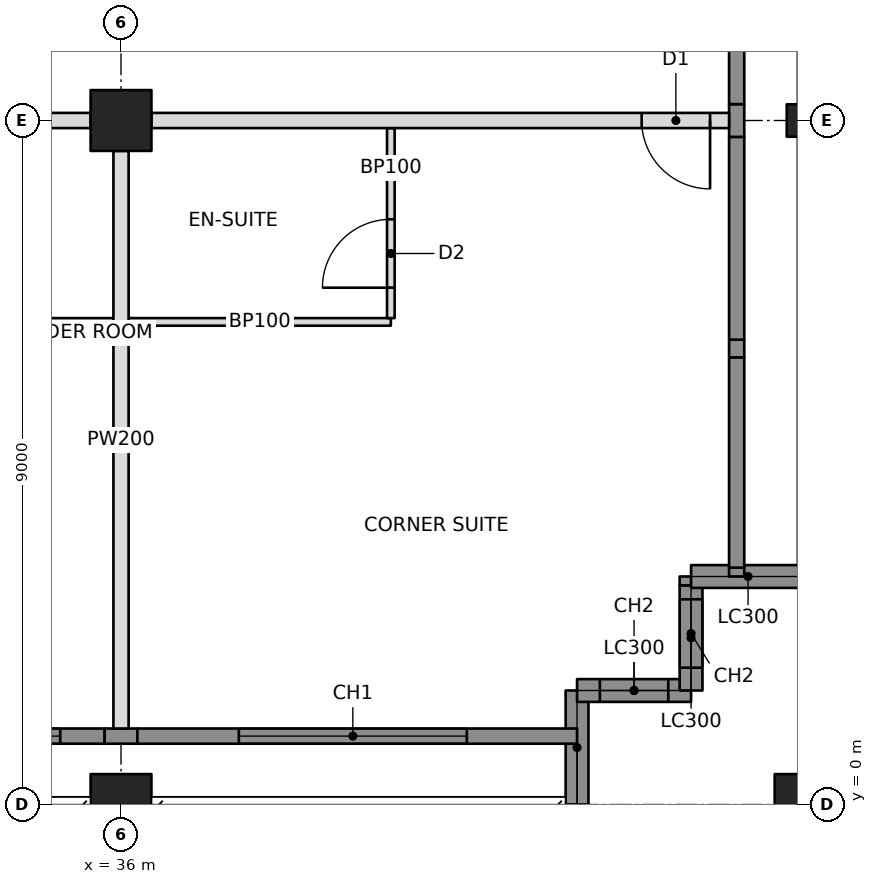
"""IFC4 building model, lengths in metres.
Left out: names, types, materials, properties, quantities, classifications, styles, units other than length and angle.
Written with IfcOpenShell. Run it as: python <this file> out.ifc"""

import sys

from ifc_helpers import new_model, si_unit, direction, frame, frame_2d, origin, origin_2d, place, context, subcontext, project, spatial, rectangle, hollow_rectangle, i_section, extrude, element, fill, save


model = new_model("IFC4")
c1 = context("Model", 3, precision=1e-05, world=origin(), true_north=direction((0.0, 1.0)))
c2 = subcontext(c1, "Body", "Model", "MODEL_VIEW")
j1 = project(units=[si_unit("LENGTHUNIT", "METRE"), si_unit("PLANEANGLEUNIT", "RADIAN")], contexts=[c1])
p1 = place(None, origin())
s1 = spatial("IfcSite", under=j1, at=p1, CompositionType="ELEMENT")
p2 = place(p1, origin())
s2 = spatial("IfcBuilding", under=s1, at=p2, CompositionType="ELEMENT")
p3 = place(p2, frame((0.0, 0.0, 218.2)))
s3 = spatial("IfcBuildingStorey", under=s2, at=p3, CompositionType="ELEMENT", Elevation=218.2)
p4 = place(p3, frame((36.0, 0.0, 0.0), z_axis=(0.0, 0.0, 1.0), x_axis=(1.0, 0.0, 0.0)))
e1 = element("IfcColumn", 1, at=p4, inside=s3, PredefinedType="COLUMN", context=c2, shape_type="SweptSolid", body=[
    extrude(hollow_rectangle(XDim=0.8, YDim=0.8, WallThickness=0.06, at=origin_2d()), origin(), (0.0, 0.0, 1.0), 3.4),
])
p5 = place(p3, frame((36.0, 9.0, 0.0), z_axis=(0.0, 0.0, 1.0), x_axis=(0.0, 1.0, 0.0)))
e2 = element("IfcColumn", 2, at=p5, inside=s3, PredefinedType="COLUMN", context=c2, shape_type="SweptSolid", body=[
    extrude(hollow_rectangle(XDim=0.8, YDim=0.8, WallThickness=0.1, at=origin_2d()), origin(), (0.0, 0.0, 1.0), 3.4),
])
p6 = place(p3, frame((45.0, 0.0, 0.0), z_axis=(0.0, 0.0, 1.0), x_axis=(1.0, 0.0, 0.0)))
e3 = element("IfcColumn", 3, at=p6, inside=s3, PredefinedType="COLUMN", context=c2, shape_type="SweptSolid", body=[
    extrude(hollow_rectangle(XDim=0.8, YDim=0.8, WallThickness=0.06, at=origin_2d()), origin(), (0.0, 0.0, 1.0), 3.4),
])
p7 = place(p3, frame((45.0, 9.0, 0.0), z_axis=(0.0, 0.0, 1.0), x_axis=(0.0, 1.0, 0.0)))
e4 = element("IfcColumn", 4, at=p7, inside=s3, PredefinedType="COLUMN", context=c2, shape_type="SweptSolid", body=[
    extrude(i_section(OverallWidth=0.427, OverallDepth=0.483, WebThickness=0.051, FlangeThickness=0.082, at=origin_2d()), origin(), (0.0, 0.0, 1.0), 3.4),
])
p8 = place(p3, frame((42.0, 0.0, 0.0), z_axis=(0.0, 0.0, 1.0), x_axis=(0.0, 1.0, 0.0)))
e5 = element("IfcWall", 5, at=p8, inside=s3, PredefinedType="SOLIDWALL", context=c2, shape_type="SweptSolid", body=[
    extrude(rectangle(XDim=1.5, YDim=0.3, at=frame_2d((0.75, 0.0))), origin(), (0.0, 0.0, 1.0), 2.202),
])
p9 = place(p3, frame((42.0, 1.5, 0.0), z_axis=(0.0, 0.0, 1.0), x_axis=(1.0, 0.0, 0.0)))
e6 = element("IfcWall", 6, at=p9, inside=s3, PredefinedType="SOLIDWALL", context=c2, shape_type="SweptSolid", body=[
    extrude(rectangle(XDim=1.5, YDim=0.3, at=frame_2d((0.75, 0.0))), origin(), (0.0, 0.0, 1.0), 3.15),
])
p10 = place(p9, frame((0.3, 0.0, 0.6)))
e7 = element("IfcOpeningElement", 7, at=p10, cuts=e6, PredefinedType="OPENING", context=c2, shape_type="SweptSolid", body=[
    extrude(rectangle(XDim=0.9, YDim=2.2, at=frame_2d((0.45, 1.1))), frame((0.0, 0.16, 0.0), z_axis=(0.0, -1.0, 0.0), x_axis=(1.0, 0.0, 0.0)), (0.0, 0.0, 1.0), 0.32),
])
p11 = place(p3, frame((43.5, 1.5, 0.0), z_axis=(0.0, 0.0, 1.0), x_axis=(0.0, 1.0, 0.0)))
e8 = element("IfcWall", 8, at=p11, inside=s3, PredefinedType="SOLIDWALL", context=c2, shape_type="SweptSolid", body=[
    extrude(rectangle(XDim=1.384, YDim=0.3, at=frame_2d((0.692, 0.0))), origin(), (0.0, 0.0, 1.0), 3.15),
])
p12 = place(p11, frame((0.3, 0.0, 0.6)))
e9 = element("IfcOpeningElement", 9, at=p12, cuts=e8, PredefinedType="OPENING", context=c2, shape_type="SweptSolid", body=[
    extrude(rectangle(XDim=0.9, YDim=2.2, at=frame_2d((0.45, 1.1))), frame((0.0, 0.16, 0.0), z_axis=(0.0, -1.0, 0.0), x_axis=(1.0, 0.0, 0.0)), (0.0, 0.0, 1.0), 0.32),
])
p13 = place(p3, frame((43.5, 3.0, 0.0), z_axis=(0.0, 0.0, 1.0), x_axis=(1.0, 0.0, 0.0)))
e10 = element("IfcWall", 10, at=p13, inside=s3, PredefinedType="SOLIDWALL", context=c2, shape_type="SweptSolid", body=[
    extrude(rectangle(XDim=1.5, YDim=0.3, at=frame_2d((0.75, 0.0))), origin(), (0.0, 0.0, 1.0), 2.202),
])
p14 = place(p3, frame((44.1, 3.0, 0.0), z_axis=(0.0, 0.0, 1.0), x_axis=(0.0, 1.0, 0.0)))
e11 = element("IfcWall", 11, at=p14, inside=s3, PredefinedType="SOLIDWALL", context=c2, shape_type="SweptSolid", body=[
    extrude(rectangle(XDim=0.116, YDim=0.2, at=frame_2d((0.058, 0.0))), origin(), (0.0, 0.0, 1.0), 2.542),
])
p15 = place(p3, frame((27.4, 9.0, 0.0), z_axis=(0.0, 0.0, 1.0), x_axis=(1.0, 0.0, 0.0)))
e12 = element("IfcWall", 12, at=p15, inside=s3, PredefinedType="PARTITIONING", context=c2, shape_type="SweptSolid", body=[
    extrude(rectangle(XDim=8.2, YDim=0.2, at=frame_2d((4.1, 0.0))), origin(), (0.0, 0.0, 1.0), 2.21),
])
p16 = place(p15, frame((0.15, 0.0, 0.0)))
e13 = element("IfcOpeningElement", 13, at=p16, cuts=e12, PredefinedType="OPENING", context=c2, shape_type="SweptSolid", body=[
    extrude(rectangle(XDim=0.9, YDim=2.1, at=frame_2d((0.45, 1.05))), frame((0.0, 0.11, 0.0), z_axis=(0.0, -1.0, 0.0), x_axis=(1.0, 0.0, 0.0)), (0.0, 0.0, 1.0), 0.22),
])
p17 = place(p3, frame((36.4, 9.0, 0.0), z_axis=(0.0, 0.0, 1.0), x_axis=(1.0, 0.0, 0.0)))
e14 = element("IfcWall", 14, at=p17, inside=s3, PredefinedType="PARTITIONING", context=c2, shape_type="SweptSolid", body=[
    extrude(rectangle(XDim=7.6, YDim=0.2, at=frame_2d((3.8, 0.0))), origin(), (0.0, 0.0, 1.0), 2.21),
])
p18 = place(p17, frame((6.45, 0.0, 0.0)))
e15 = element("IfcOpeningElement", 15, at=p18, cuts=e14, PredefinedType="OPENING", context=c2, shape_type="SweptSolid", body=[
    extrude(rectangle(XDim=0.9, YDim=2.1, at=frame_2d((0.45, 1.05))), frame((0.0, 0.11, 0.0), z_axis=(0.0, -1.0, 0.0), x_axis=(1.0, 0.0, 0.0)), (0.0, 0.0, 1.0), 0.22),
])
p19 = place(p3, frame((36.0, 8.6, 0.0), z_axis=(0.0, 0.0, 1.0), x_axis=(0.0, -1.0, 0.0)))
e16 = element("IfcWall", 16, at=p19, inside=s3, PredefinedType="PARTITIONING", context=c2, shape_type="SweptSolid", body=[
    extrude(rectangle(XDim=7.6, YDim=0.2, at=frame_2d((3.8, 0.0))), origin(), (0.0, 0.0, 1.0), 2.21),
])
p20 = place(p3, frame((34.05, 6.35, 0.0), z_axis=(0.0, 0.0, 1.0), x_axis=(1.0, 0.0, 0.0)))
e17 = element("IfcWall", 17, at=p20, inside=s3, PredefinedType="PARTITIONING", context=c2, shape_type="SweptSolid", body=[
    extrude(rectangle(XDim=1.85, YDim=0.1, at=frame_2d((0.925, 0.0))), origin(), (0.0, 0.0, 1.0), 2.21),
])
p21 = place(p3, frame((36.1, 6.35, 0.0), z_axis=(0.0, 0.0, 1.0), x_axis=(1.0, 0.0, 0.0)))
e18 = element("IfcWall", 18, at=p21, inside=s3, PredefinedType="PARTITIONING", context=c2, shape_type="SweptSolid", body=[
    extrude(rectangle(XDim=3.45, YDim=0.1, at=frame_2d((1.725, 0.0))), origin(), (0.0, 0.0, 1.0), 2.21),
])
p22 = place(p3, frame((39.55, 8.9, 0.0), z_axis=(0.0, 0.0, 1.0), x_axis=(0.0, -1.0, 0.0)))
e19 = element("IfcWall", 19, at=p22, inside=s3, PredefinedType="PARTITIONING", context=c2, shape_type="SweptSolid", body=[
    extrude(rectangle(XDim=2.5, YDim=0.1, at=frame_2d((1.25, 0.0))), origin(), (0.0, 0.0, 1.0), 2.21),
])
p23 = place(p22, frame((1.2, 0.0, 0.0)))
e20 = element("IfcOpeningElement", 20, at=p23, cuts=e19, PredefinedType="OPENING", context=c2, shape_type="SweptSolid", body=[
    extrude(rectangle(XDim=0.9, YDim=2.1, at=frame_2d((0.45, 1.05))), frame((0.0, 0.06, 0.0), z_axis=(0.0, -1.0, 0.0), x_axis=(1.0, 0.0, 0.0)), (0.0, 0.0, 1.0), 0.12),
])
p24 = place(p3, frame((43.5, 2.884, 0.0), z_axis=(0.0, 0.0, 1.0), x_axis=(0.0, 1.0, 0.0)))
e21 = element("IfcWall", 21, at=p24, inside=s3, PredefinedType="SOLIDWALL", context=c2, shape_type="SweptSolid", body=[
    extrude(rectangle(XDim=0.116, YDim=0.3, at=frame_2d((0.058, 0.0))), origin(), (0.0, 0.0, 1.0), 2.542),
])
p25 = place(p3, frame((27.214, 0.9, 0.0), z_axis=(0.0, 0.0, 1.0), x_axis=(1.0, 0.0, 0.0)))
e22 = element("IfcWall", 22, at=p25, inside=s3, PredefinedType="SOLIDWALL", context=c2, shape_type="SweptSolid", body=[
    extrude(rectangle(XDim=8.571, YDim=0.2, at=frame_2d((4.285, 0.0))), origin(), (0.0, 0.0, 1.0), 3.15),
])
p26 = place(p25, frame((0.586, 0.0, 0.6)))
e23 = element("IfcOpeningElement", 23, at=p26, cuts=e22, PredefinedType="OPENING", context=c2, shape_type="SweptSolid", body=[
    extrude(rectangle(XDim=3.0, YDim=2.2, at=frame_2d((1.5, 1.1))), frame((0.0, 0.11, 0.0), z_axis=(0.0, -1.0, 0.0), x_axis=(1.0, 0.0, 0.0)), (0.0, 0.0, 1.0), 0.22),
])
p27 = place(p25, frame((4.986, 0.0, 0.6)))
e24 = element("IfcOpeningElement", 24, at=p27, cuts=e22, PredefinedType="OPENING", context=c2, shape_type="SweptSolid", body=[
    extrude(rectangle(XDim=3.0, YDim=2.2, at=frame_2d((1.5, 1.1))), frame((0.0, 0.11, 0.0), z_axis=(0.0, -1.0, 0.0), x_axis=(1.0, 0.0, 0.0)), (0.0, 0.0, 1.0), 0.22),
])
p28 = place(p3, frame((35.785, 0.9, 0.0), z_axis=(0.0, 0.0, 1.0), x_axis=(1.0, 0.0, 0.0)))
e25 = element("IfcWall", 25, at=p28, inside=s3, PredefinedType="SOLIDWALL", context=c2, shape_type="SweptSolid", body=[
    extrude(rectangle(XDim=0.431, YDim=0.2, at=frame_2d((0.215, 0.0))), origin(), (0.0, 0.0, 1.0), 2.21),
])
p29 = place(p3, frame((36.215, 0.9, 0.0), z_axis=(0.0, 0.0, 1.0), x_axis=(1.0, 0.0, 0.0)))
e26 = element("IfcWall", 26, at=p29, inside=s3, PredefinedType="SOLIDWALL", context=c2, shape_type="SweptSolid", body=[
    extrude(rectangle(XDim=5.785, YDim=0.2, at=frame_2d((2.892, 0.0))), origin(), (0.0, 0.0, 1.0), 3.15),
])
p30 = place(p29, frame((1.335, 0.0, 0.6)))
e27 = element("IfcOpeningElement", 27, at=p30, cuts=e26, PredefinedType="OPENING", context=c2, shape_type="SweptSolid", body=[
    extrude(rectangle(XDim=3.0, YDim=2.2, at=frame_2d((1.5, 1.1))), frame((0.0, 0.11, 0.0), z_axis=(0.0, -1.0, 0.0), x_axis=(1.0, 0.0, 0.0)), (0.0, 0.0, 1.0), 0.22),
])
p31 = place(p3, frame((44.1, 3.116, 0.0), z_axis=(0.0, 0.0, 1.0), x_axis=(0.0, 1.0, 0.0)))
e28 = element("IfcWall", 28, at=p31, inside=s3, PredefinedType="SOLIDWALL", context=c2, shape_type="SweptSolid", body=[
    extrude(rectangle(XDim=2.768, YDim=0.2, at=frame_2d((1.384, 0.0))), origin(), (0.0, 0.0, 1.0), 3.15),
])
p32 = place(p3, frame((44.1, 5.884, 0.0), z_axis=(0.0, 0.0, 1.0), x_axis=(0.0, 1.0, 0.0)))
e29 = element("IfcWall", 29, at=p32, inside=s3, PredefinedType="SOLIDWALL", context=c2, shape_type="SweptSolid", body=[
    extrude(rectangle(XDim=0.232, YDim=0.2, at=frame_2d((0.116, 0.0))), origin(), (0.0, 0.0, 1.0), 2.542),
])
p33 = place(p3, frame((44.1, 6.116, 0.0), z_axis=(0.0, 0.0, 1.0), x_axis=(0.0, 1.0, 0.0)))
e30 = element("IfcWall", 30, at=p33, inside=s3, PredefinedType="SOLIDWALL", context=c2, shape_type="SweptSolid", body=[
    extrude(rectangle(XDim=2.668, YDim=0.2, at=frame_2d((1.334, 0.0))), origin(), (0.0, 0.0, 1.0), 3.15),
])
p34 = place(p3, frame((44.1, 8.785, 0.0), z_axis=(0.0, 0.0, 1.0), x_axis=(0.0, 1.0, 0.0)))
e31 = element("IfcWall", 31, at=p34, inside=s3, PredefinedType="SOLIDWALL", context=c2, shape_type="SweptSolid", body=[
    extrude(rectangle(XDim=0.431, YDim=0.2, at=frame_2d((0.215, 0.0))), origin(), (0.0, 0.0, 1.0), 2.21),
])
p35 = place(p3, frame((44.1, 9.215, 0.0), z_axis=(0.0, 0.0, 1.0), x_axis=(0.0, 1.0, 0.0)))
e32 = element("IfcWall", 32, at=p35, inside=s3, PredefinedType="SOLIDWALL", context=c2, shape_type="SweptSolid", body=[
    extrude(rectangle(XDim=8.571, YDim=0.2, at=frame_2d((4.285, 0.0))), origin(), (0.0, 0.0, 1.0), 3.15),
])
p36 = place(p35, frame((1.935, 0.0, 0.6)))
e33 = element("IfcOpeningElement", 33, at=p36, cuts=e32, PredefinedType="OPENING", context=c2, shape_type="SweptSolid", body=[
    extrude(rectangle(XDim=3.0, YDim=2.2, at=frame_2d((1.5, 1.1))), frame((0.0, 0.11, 0.0), z_axis=(0.0, -1.0, 0.0), x_axis=(1.0, 0.0, 0.0)), (0.0, 0.0, 1.0), 0.22),
])
p37 = place(p35, frame((5.435, 0.0, 0.6)))
e34 = element("IfcOpeningElement", 34, at=p37, cuts=e32, PredefinedType="OPENING", context=c2, shape_type="SweptSolid", body=[
    extrude(rectangle(XDim=3.0, YDim=2.2, at=frame_2d((1.5, 1.1))), frame((0.0, 0.11, 0.0), z_axis=(0.0, -1.0, 0.0), x_axis=(1.0, 0.0, 0.0)), (0.0, 0.0, 1.0), 0.22),
])
p38 = place(p10, origin())
e35 = element("IfcWindow", 35, at=p38, inside=s3, PartitioningType="SINGLE_PANEL", PredefinedType="WINDOW", context=c2, shape_type="SweptSolid", body=[
    extrude(rectangle(XDim=0.9, YDim=2.2, at=frame_2d((0.45, 1.1))), frame((0.0, 0.03, 0.0), z_axis=(0.0, -1.0, 0.0), x_axis=(1.0, 0.0, 0.0)), (0.0, 0.0, 1.0), 0.06),
])
fill(e7, e35)
p39 = place(p12, origin())
e36 = element("IfcWindow", 36, at=p39, inside=s3, PartitioningType="SINGLE_PANEL", PredefinedType="WINDOW", context=c2, shape_type="SweptSolid", body=[
    extrude(rectangle(XDim=0.9, YDim=2.2, at=frame_2d((0.45, 1.1))), frame((0.0, 0.03, 0.0), z_axis=(0.0, -1.0, 0.0), x_axis=(1.0, 0.0, 0.0)), (0.0, 0.0, 1.0), 0.06),
])
fill(e9, e36)
p40 = place(p27, origin())
e37 = element("IfcWindow", 37, at=p40, inside=s3, PartitioningType="TRIPLE_PANEL_VERTICAL", PredefinedType="WINDOW", context=c2, shape_type="SweptSolid", body=[
    extrude(rectangle(XDim=3.0, YDim=2.2, at=frame_2d((1.5, 1.1))), frame((0.0, 0.03, 0.0), z_axis=(0.0, -1.0, 0.0), x_axis=(1.0, 0.0, 0.0)), (0.0, 0.0, 1.0), 0.06),
])
fill(e24, e37)
p41 = place(p30, origin())
e38 = element("IfcWindow", 38, at=p41, inside=s3, PartitioningType="TRIPLE_PANEL_VERTICAL", PredefinedType="WINDOW", context=c2, shape_type="SweptSolid", body=[
    extrude(rectangle(XDim=3.0, YDim=2.2, at=frame_2d((1.5, 1.1))), frame((0.0, 0.03, 0.0), z_axis=(0.0, -1.0, 0.0), x_axis=(1.0, 0.0, 0.0)), (0.0, 0.0, 1.0), 0.06),
])
fill(e27, e38)
p42 = place(p23, frame((0.9, 0.0, 0.0), z_axis=(0.0, 0.0, 1.0), x_axis=(-1.0, 0.0, 0.0)))
e39 = element("IfcDoor", 39, at=p42, inside=s3, OperationType="SINGLE_SWING_LEFT", PredefinedType="DOOR", context=c2, shape_type="SweptSolid", body=[
    extrude(rectangle(XDim=0.9, YDim=2.1, at=frame_2d((0.45, 1.05))), frame((0.0, 0.025, 0.0), z_axis=(0.0, -1.0, 0.0), x_axis=(1.0, 0.0, 0.0)), (0.0, 0.0, 1.0), 0.05),
])
fill(e20, e39)
p43 = place(p18, frame((0.9, 0.0, 0.0), z_axis=(0.0, 0.0, 1.0), x_axis=(-1.0, 0.0, 0.0)))
e40 = element("IfcDoor", 40, at=p43, inside=s3, OperationType="SINGLE_SWING_LEFT", PredefinedType="DOOR", context=c2, shape_type="SweptSolid", body=[
    extrude(rectangle(XDim=0.9, YDim=2.1, at=frame_2d((0.45, 1.05))), frame((0.0, 0.025, 0.0), z_axis=(0.0, -1.0, 0.0), x_axis=(1.0, 0.0, 0.0)), (0.0, 0.0, 1.0), 0.05),
])
fill(e15, e40)
save(model, sys.argv[1])
